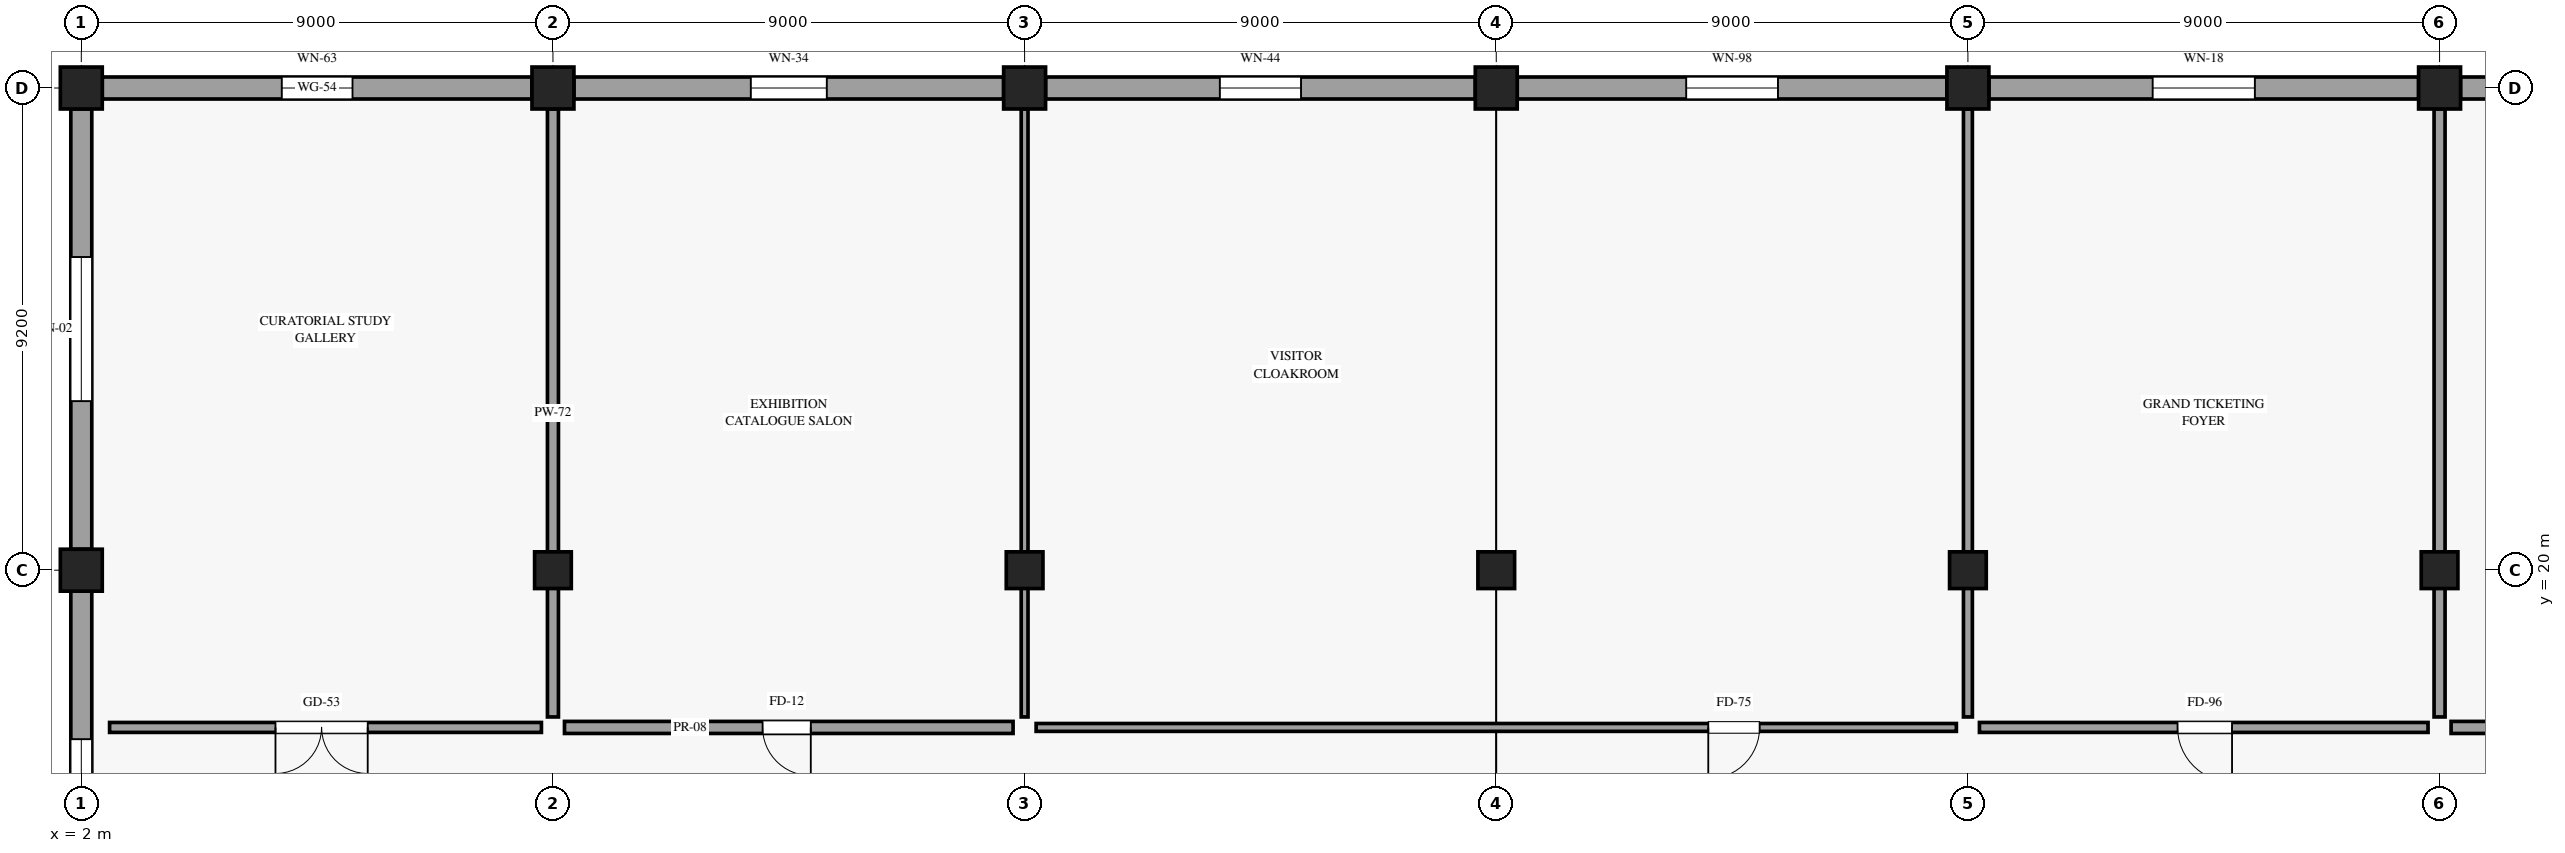
"""IFC4 building model, lengths in metres.
Left out: names, types, materials, properties, quantities, classifications, styles, units other than length and angle.
Written with IfcOpenShell. Run it as: python <this file> out.ifc"""

import sys

from ifc_helpers import new_model, si_unit, direction, frame, frame_2d, origin, origin_2d, place, context, subcontext, project, spatial, rectangle, extrude, element, fill, save


model = new_model("IFC4")
c1 = context("Model", 3, precision=1e-05, world=origin(), true_north=direction((0.0, 1.0)))
c2 = subcontext(c1, "Body", "Model", "MODEL_VIEW")
j1 = project(units=[si_unit("LENGTHUNIT", "METRE"), si_unit("PLANEANGLEUNIT", "RADIAN")], contexts=[c1])
p1 = place(None, origin())
s1 = spatial("IfcSite", under=j1, at=p1, CompositionType="ELEMENT")
p2 = place(p1, origin())
s2 = spatial("IfcBuilding", under=s1, at=p2, CompositionType="ELEMENT")
p3 = place(p2, origin())
s3 = spatial("IfcBuildingStorey", under=s2, at=p3, CompositionType="ELEMENT", Elevation=0.0)
for number, where, z_axis, x_axis in (
    (1, (2.0, 20.0, 0.0), (0.0, 0.0, 1.0), (1.0, 0.0, 0.0)),
    (2, (2.0, 29.2, 0.0), (0.0, 0.0, 1.0), (1.0, 0.0, 0.0)),
):
    element("IfcColumn", number, at=place(p3, frame(where, z_axis=z_axis, x_axis=x_axis)), inside=s3, PredefinedType="COLUMN", context=c2, shape_type="SweptSolid", body=[
        extrude(rectangle(XDim=0.8, YDim=0.8, at=origin_2d()), origin(), (0.0, 0.0, 1.0), 5.4),
    ])
p4 = place(p3, frame((11.0, 20.0, 0.0), z_axis=(0.0, 0.0, 1.0), x_axis=(1.0, 0.0, 0.0)))
e3 = element("IfcColumn", 3, at=p4, inside=s3, PredefinedType="COLUMN", context=c2, shape_type="SweptSolid", body=[
    extrude(rectangle(XDim=0.7, YDim=0.7, at=origin_2d()), origin(), (0.0, 0.0, 1.0), 5.4),
])
p5 = place(p3, frame((11.0, 29.2, 0.0), z_axis=(0.0, 0.0, 1.0), x_axis=(1.0, 0.0, 0.0)))
e4 = element("IfcColumn", 4, at=p5, inside=s3, PredefinedType="COLUMN", context=c2, shape_type="SweptSolid", body=[
    extrude(rectangle(XDim=0.8, YDim=0.8, at=origin_2d()), origin(), (0.0, 0.0, 1.0), 5.4),
])
p6 = place(p3, frame((20.0, 20.0, 0.0), z_axis=(0.0, 0.0, 1.0), x_axis=(1.0, 0.0, 0.0)))
e5 = element("IfcColumn", 5, at=p6, inside=s3, PredefinedType="COLUMN", context=c2, shape_type="SweptSolid", body=[
    extrude(rectangle(XDim=0.7, YDim=0.7, at=origin_2d()), origin(), (0.0, 0.0, 1.0), 5.4),
])
p7 = place(p3, frame((20.0, 29.2, 0.0), z_axis=(0.0, 0.0, 1.0), x_axis=(1.0, 0.0, 0.0)))
e6 = element("IfcColumn", 6, at=p7, inside=s3, PredefinedType="COLUMN", context=c2, shape_type="SweptSolid", body=[
    extrude(rectangle(XDim=0.8, YDim=0.8, at=origin_2d()), origin(), (0.0, 0.0, 1.0), 5.4),
])
p8 = place(p3, frame((29.0, 20.0, 0.0), z_axis=(0.0, 0.0, 1.0), x_axis=(1.0, 0.0, 0.0)))
e7 = element("IfcColumn", 7, at=p8, inside=s3, PredefinedType="COLUMN", context=c2, shape_type="SweptSolid", body=[
    extrude(rectangle(XDim=0.7, YDim=0.7, at=origin_2d()), origin(), (0.0, 0.0, 1.0), 5.4),
])
p9 = place(p3, frame((29.0, 29.2, 0.0), z_axis=(0.0, 0.0, 1.0), x_axis=(1.0, 0.0, 0.0)))
e8 = element("IfcColumn", 8, at=p9, inside=s3, PredefinedType="COLUMN", context=c2, shape_type="SweptSolid", body=[
    extrude(rectangle(XDim=0.8, YDim=0.8, at=origin_2d()), origin(), (0.0, 0.0, 1.0), 5.4),
])
p10 = place(p3, frame((38.0, 20.0, 0.0), z_axis=(0.0, 0.0, 1.0), x_axis=(1.0, 0.0, 0.0)))
e9 = element("IfcColumn", 9, at=p10, inside=s3, PredefinedType="COLUMN", context=c2, shape_type="SweptSolid", body=[
    extrude(rectangle(XDim=0.7, YDim=0.7, at=origin_2d()), origin(), (0.0, 0.0, 1.0), 5.4),
])
p11 = place(p3, frame((38.0, 29.2, 0.0), z_axis=(0.0, 0.0, 1.0), x_axis=(1.0, 0.0, 0.0)))
e10 = element("IfcColumn", 10, at=p11, inside=s3, PredefinedType="COLUMN", context=c2, shape_type="SweptSolid", body=[
    extrude(rectangle(XDim=0.8, YDim=0.8, at=origin_2d()), origin(), (0.0, 0.0, 1.0), 5.4),
])
p12 = place(p3, frame((47.0, 20.0, 0.0), z_axis=(0.0, 0.0, 1.0), x_axis=(1.0, 0.0, 0.0)))
e11 = element("IfcColumn", 11, at=p12, inside=s3, PredefinedType="COLUMN", context=c2, shape_type="SweptSolid", body=[
    extrude(rectangle(XDim=0.7, YDim=0.7, at=origin_2d()), origin(), (0.0, 0.0, 1.0), 5.4),
])
p13 = place(p3, frame((47.0, 29.2, 0.0), z_axis=(0.0, 0.0, 1.0), x_axis=(1.0, 0.0, 0.0)))
e12 = element("IfcColumn", 12, at=p13, inside=s3, PredefinedType="COLUMN", context=c2, shape_type="SweptSolid", body=[
    extrude(rectangle(XDim=0.8, YDim=0.8, at=origin_2d()), origin(), (0.0, 0.0, 1.0), 5.4),
])
p14 = place(p3, frame((2.4, 29.2, 0.0), z_axis=(0.0, 0.0, 1.0), x_axis=(1.0, 0.0, 0.0)))
e13 = element("IfcWall", 13, at=p14, inside=s3, PredefinedType="STANDARD", context=c2, shape_type="SweptSolid", body=[
    extrude(rectangle(XDim=8.2, YDim=0.42, at=frame_2d((4.1, 0.0))), origin(), (0.0, 0.0, 1.0), 4.095),
])
p15 = place(p14, frame((3.425, 0.0, 0.85)))
e14 = element("IfcOpeningElement", 14, at=p15, cuts=e13, PredefinedType="OPENING", context=c2, shape_type="SweptSolid", body=[
    extrude(rectangle(XDim=1.35, YDim=1.75, at=frame_2d((0.675, 0.875))), frame((0.0, 0.22, 0.0), z_axis=(0.0, -1.0, 0.0), x_axis=(1.0, 0.0, 0.0)), (0.0, 0.0, 1.0), 0.44),
])
p16 = place(p3, frame((11.4, 29.2, 0.0), z_axis=(0.0, 0.0, 1.0), x_axis=(1.0, 0.0, 0.0)))
e15 = element("IfcWall", 15, at=p16, inside=s3, PredefinedType="STANDARD", context=c2, shape_type="SweptSolid", body=[
    extrude(rectangle(XDim=8.2, YDim=0.42, at=frame_2d((4.1, 0.0))), origin(), (0.0, 0.0, 1.0), 4.095),
])
p17 = place(p16, frame((3.375, 0.0, 0.85)))
e16 = element("IfcOpeningElement", 16, at=p17, cuts=e15, PredefinedType="OPENING", context=c2, shape_type="SweptSolid", body=[
    extrude(rectangle(XDim=1.45, YDim=1.85, at=frame_2d((0.725, 0.925))), frame((0.0, 0.22, 0.0), z_axis=(0.0, -1.0, 0.0), x_axis=(1.0, 0.0, 0.0)), (0.0, 0.0, 1.0), 0.44),
])
p18 = place(p3, frame((20.4, 29.2, 0.0), z_axis=(0.0, 0.0, 1.0), x_axis=(1.0, 0.0, 0.0)))
e17 = element("IfcWall", 17, at=p18, inside=s3, PredefinedType="STANDARD", context=c2, shape_type="SweptSolid", body=[
    extrude(rectangle(XDim=8.2, YDim=0.42, at=frame_2d((4.1, 0.0))), origin(), (0.0, 0.0, 1.0), 4.095),
])
p19 = place(p18, frame((3.325, 0.0, 0.85)))
e18 = element("IfcOpeningElement", 18, at=p19, cuts=e17, PredefinedType="OPENING", context=c2, shape_type="SweptSolid", body=[
    extrude(rectangle(XDim=1.55, YDim=1.95, at=frame_2d((0.775, 0.975))), frame((0.0, 0.22, 0.0), z_axis=(0.0, -1.0, 0.0), x_axis=(1.0, 0.0, 0.0)), (0.0, 0.0, 1.0), 0.44),
])
p20 = place(p3, frame((29.4, 29.2, 0.0), z_axis=(0.0, 0.0, 1.0), x_axis=(1.0, 0.0, 0.0)))
e19 = element("IfcWall", 19, at=p20, inside=s3, PredefinedType="STANDARD", context=c2, shape_type="SweptSolid", body=[
    extrude(rectangle(XDim=8.2, YDim=0.42, at=frame_2d((4.1, 0.0))), origin(), (0.0, 0.0, 1.0), 4.095),
])
p21 = place(p20, frame((3.225, 0.0, 0.85)))
e20 = element("IfcOpeningElement", 20, at=p21, cuts=e19, PredefinedType="OPENING", context=c2, shape_type="SweptSolid", body=[
    extrude(rectangle(XDim=1.75, YDim=2.05, at=frame_2d((0.875, 1.025))), frame((0.0, 0.22, 0.0), z_axis=(0.0, -1.0, 0.0), x_axis=(1.0, 0.0, 0.0)), (0.0, 0.0, 1.0), 0.44),
])
p22 = place(p3, frame((38.4, 29.2, 0.0), z_axis=(0.0, 0.0, 1.0), x_axis=(1.0, 0.0, 0.0)))
e21 = element("IfcWall", 21, at=p22, inside=s3, PredefinedType="STANDARD", context=c2, shape_type="SweptSolid", body=[
    extrude(rectangle(XDim=8.2, YDim=0.42, at=frame_2d((4.1, 0.0))), origin(), (0.0, 0.0, 1.0), 4.095),
])
p23 = place(p22, frame((3.125, 0.0, 0.85)))
e22 = element("IfcOpeningElement", 22, at=p23, cuts=e21, PredefinedType="OPENING", context=c2, shape_type="SweptSolid", body=[
    extrude(rectangle(XDim=1.95, YDim=2.15, at=frame_2d((0.975, 1.075))), frame((0.0, 0.22, 0.0), z_axis=(0.0, -1.0, 0.0), x_axis=(1.0, 0.0, 0.0)), (0.0, 0.0, 1.0), 0.44),
])
p24 = place(p3, frame((47.4, 29.2, 0.0), z_axis=(0.0, 0.0, 1.0), x_axis=(1.0, 0.0, 0.0)))
e23 = element("IfcWall", 23, at=p24, inside=s3, PredefinedType="STANDARD", context=c2, shape_type="SweptSolid", body=[
    extrude(rectangle(XDim=8.2, YDim=0.42, at=frame_2d((4.1, 0.0))), origin(), (0.0, 0.0, 1.0), 4.095),
])
p25 = place(p24, frame((3.075, 0.0, 0.85)))
e24 = element("IfcOpeningElement", 24, at=p25, cuts=e23, PredefinedType="OPENING", context=c2, shape_type="SweptSolid", body=[
    extrude(rectangle(XDim=2.05, YDim=2.2, at=frame_2d((1.025, 1.1))), frame((0.0, 0.22, 0.0), z_axis=(0.0, -1.0, 0.0), x_axis=(1.0, 0.0, 0.0)), (0.0, 0.0, 1.0), 0.44),
])
p26 = place(p3, frame((2.0, 11.4, 0.0), z_axis=(0.0, 0.0, 1.0), x_axis=(0.0, 1.0, 0.0)))
e25 = element("IfcWall", 25, at=p26, inside=s3, PredefinedType="STANDARD", context=c2, shape_type="SweptSolid", body=[
    extrude(rectangle(XDim=8.2, YDim=0.4, at=frame_2d((4.1, 0.0))), origin(), (0.0, 0.0, 1.0), 4.095),
])
p27 = place(p26, frame((2.825, 0.0, 0.85)))
e26 = element("IfcOpeningElement", 26, at=p27, cuts=e25, PredefinedType="OPENING", context=c2, shape_type="SweptSolid", body=[
    extrude(rectangle(XDim=2.55, YDim=2.4, at=frame_2d((1.275, 1.2))), frame((0.0, 0.21, 0.0), z_axis=(0.0, -1.0, 0.0), x_axis=(1.0, 0.0, 0.0)), (0.0, 0.0, 1.0), 0.42),
])
p28 = place(p3, frame((2.0, 20.4, 0.0), z_axis=(0.0, 0.0, 1.0), x_axis=(0.0, 1.0, 0.0)))
e27 = element("IfcWall", 27, at=p28, inside=s3, PredefinedType="STANDARD", context=c2, shape_type="SweptSolid", body=[
    extrude(rectangle(XDim=8.4, YDim=0.4, at=frame_2d((4.2, 0.0))), origin(), (0.0, 0.0, 1.0), 4.095),
])
p29 = place(p28, frame((2.825, 0.0, 0.85)))
e28 = element("IfcOpeningElement", 28, at=p29, cuts=e27, PredefinedType="OPENING", context=c2, shape_type="SweptSolid", body=[
    extrude(rectangle(XDim=2.75, YDim=2.45, at=frame_2d((1.375, 1.225))), frame((0.0, 0.21, 0.0), z_axis=(0.0, -1.0, 0.0), x_axis=(1.0, 0.0, 0.0)), (0.0, 0.0, 1.0), 0.42),
])
p30 = place(p3, frame((2.54, 17.0, 0.0), z_axis=(0.0, 0.0, 1.0), x_axis=(1.0, 0.0, 0.0)))
e29 = element("IfcWall", 29, at=p30, inside=s3, PredefinedType="PARTITIONING", context=c2, shape_type="SweptSolid", body=[
    extrude(rectangle(XDim=8.24, YDim=0.19, at=frame_2d((4.12, 0.0))), origin(), (0.0, 0.0, 1.0), 4.095),
])
p31 = place(p30, frame((4.925, 0.0, 0.0), z_axis=(0.0, 0.0, 1.0), x_axis=(-1.0, 0.0, 0.0)))
e30 = element("IfcOpeningElement", 30, at=p31, cuts=e29, PredefinedType="OPENING", context=c2, shape_type="SweptSolid", body=[
    extrude(rectangle(XDim=1.76, YDim=2.45, at=frame_2d((0.88, 1.225))), frame((0.0, 0.105, 0.0), z_axis=(0.0, -1.0, 0.0), x_axis=(1.0, 0.0, 0.0)), (0.0, 0.0, 1.0), 0.21),
])
p32 = place(p3, frame((11.0, 17.2, 0.0), z_axis=(0.0, 0.0, 1.0), x_axis=(0.0, 1.0, 0.0)))
e31 = element("IfcWall", 31, at=p32, inside=s3, PredefinedType="PARTITIONING", context=c2, shape_type="SweptSolid", body=[
    extrude(rectangle(XDim=11.6, YDim=0.21, at=frame_2d((5.8, 0.0))), origin(), (0.0, 0.0, 1.0), 4.095),
])
p33 = place(p3, frame((11.22, 17.0, 0.0), z_axis=(0.0, 0.0, 1.0), x_axis=(1.0, 0.0, 0.0)))
e32 = element("IfcWall", 32, at=p33, inside=s3, PredefinedType="PARTITIONING", context=c2, shape_type="SweptSolid", body=[
    extrude(rectangle(XDim=8.56, YDim=0.23, at=frame_2d((4.28, 0.0))), origin(), (0.0, 0.0, 1.0), 4.095),
])
p34 = place(p33, frame((4.7, 0.0, 0.0), z_axis=(0.0, 0.0, 1.0), x_axis=(-1.0, 0.0, 0.0)))
e33 = element("IfcOpeningElement", 33, at=p34, cuts=e32, PredefinedType="OPENING", context=c2, shape_type="SweptSolid", body=[
    extrude(rectangle(XDim=0.92, YDim=2.12, at=frame_2d((0.46, 1.06))), frame((0.0, 0.125, 0.0), z_axis=(0.0, -1.0, 0.0), x_axis=(1.0, 0.0, 0.0)), (0.0, 0.0, 1.0), 0.25),
])
p35 = place(p3, frame((20.0, 17.2, 0.0), z_axis=(0.0, 0.0, 1.0), x_axis=(0.0, 1.0, 0.0)))
e34 = element("IfcWall", 34, at=p35, inside=s3, PredefinedType="PARTITIONING", context=c2, shape_type="SweptSolid", body=[
    extrude(rectangle(XDim=11.6, YDim=0.13, at=frame_2d((5.8, 0.0))), origin(), (0.0, 0.0, 1.0), 4.095),
])
p36 = place(p3, frame((20.22, 17.0, 0.0), z_axis=(0.0, 0.0, 1.0), x_axis=(1.0, 0.0, 0.0)))
e35 = element("IfcWall", 35, at=p36, inside=s3, PredefinedType="PARTITIONING", context=c2, shape_type="SweptSolid", body=[
    extrude(rectangle(XDim=17.56, YDim=0.15, at=frame_2d((8.78, 0.0))), origin(), (0.0, 0.0, 1.0), 4.095),
])
p37 = place(p36, frame((13.806, 0.0, 0.0), z_axis=(0.0, 0.0, 1.0), x_axis=(-1.0, 0.0, 0.0)))
e36 = element("IfcOpeningElement", 36, at=p37, cuts=e35, PredefinedType="OPENING", context=c2, shape_type="SweptSolid", body=[
    extrude(rectangle(XDim=0.98, YDim=2.18, at=frame_2d((0.49, 1.09))), frame((0.0, 0.085, 0.0), z_axis=(0.0, -1.0, 0.0), x_axis=(1.0, 0.0, 0.0)), (0.0, 0.0, 1.0), 0.17),
])
p38 = place(p3, frame((38.0, 17.2, 0.0), z_axis=(0.0, 0.0, 1.0), x_axis=(0.0, 1.0, 0.0)))
e37 = element("IfcWall", 37, at=p38, inside=s3, PredefinedType="PARTITIONING", context=c2, shape_type="SweptSolid", body=[
    extrude(rectangle(XDim=11.6, YDim=0.17, at=frame_2d((5.8, 0.0))), origin(), (0.0, 0.0, 1.0), 4.095),
])
p39 = place(p3, frame((38.22, 17.0, 0.0), z_axis=(0.0, 0.0, 1.0), x_axis=(1.0, 0.0, 0.0)))
e38 = element("IfcWall", 38, at=p39, inside=s3, PredefinedType="PARTITIONING", context=c2, shape_type="SweptSolid", body=[
    extrude(rectangle(XDim=8.56, YDim=0.19, at=frame_2d((4.28, 0.0))), origin(), (0.0, 0.0, 1.0), 4.095),
])
p40 = place(p39, frame((4.82, 0.0, 0.0), z_axis=(0.0, 0.0, 1.0), x_axis=(-1.0, 0.0, 0.0)))
e39 = element("IfcOpeningElement", 39, at=p40, cuts=e38, PredefinedType="OPENING", context=c2, shape_type="SweptSolid", body=[
    extrude(rectangle(XDim=1.04, YDim=2.22, at=frame_2d((0.52, 1.11))), frame((0.0, 0.105, 0.0), z_axis=(0.0, -1.0, 0.0), x_axis=(1.0, 0.0, 0.0)), (0.0, 0.0, 1.0), 0.21),
])
p41 = place(p3, frame((47.0, 17.2, 0.0), z_axis=(0.0, 0.0, 1.0), x_axis=(0.0, 1.0, 0.0)))
e40 = element("IfcWall", 40, at=p41, inside=s3, PredefinedType="PARTITIONING", context=c2, shape_type="SweptSolid", body=[
    extrude(rectangle(XDim=11.6, YDim=0.21, at=frame_2d((5.8, 0.0))), origin(), (0.0, 0.0, 1.0), 4.095),
])
p42 = place(p3, frame((47.22, 17.0, 0.0), z_axis=(0.0, 0.0, 1.0), x_axis=(1.0, 0.0, 0.0)))
e41 = element("IfcWall", 41, at=p42, inside=s3, PredefinedType="PARTITIONING", context=c2, shape_type="SweptSolid", body=[
    extrude(rectangle(XDim=9.73, YDim=0.23, at=frame_2d((4.865, 0.0))), origin(), (0.0, 0.0, 1.0), 4.095),
])
p43 = place(p42, frame((5.173, 0.0, 0.0), z_axis=(0.0, 0.0, 1.0), x_axis=(-1.0, 0.0, 0.0)))
e42 = element("IfcOpeningElement", 42, at=p43, cuts=e41, PredefinedType="OPENING", context=c2, shape_type="SweptSolid", body=[
    extrude(rectangle(XDim=1.66, YDim=2.42, at=frame_2d((0.83, 1.21))), frame((0.0, 0.125, 0.0), z_axis=(0.0, -1.0, 0.0), x_axis=(1.0, 0.0, 0.0)), (0.0, 0.0, 1.0), 0.25),
])
p44 = place(p15, origin())
e43 = element("IfcWindow", 43, at=p44, inside=s3, PartitioningType="SINGLE_PANEL", PredefinedType="WINDOW", context=c2, shape_type="SweptSolid", body=[
    extrude(rectangle(XDim=1.35, YDim=1.75, at=frame_2d((0.675, 0.875))), frame((0.0, 0.03, 0.0), z_axis=(0.0, -1.0, 0.0), x_axis=(1.0, 0.0, 0.0)), (0.0, 0.0, 1.0), 0.06),
])
fill(e14, e43)
p45 = place(p17, origin())
e44 = element("IfcWindow", 44, at=p45, inside=s3, PartitioningType="SINGLE_PANEL", PredefinedType="WINDOW", context=c2, shape_type="SweptSolid", body=[
    extrude(rectangle(XDim=1.45, YDim=1.85, at=frame_2d((0.725, 0.925))), frame((0.0, 0.03, 0.0), z_axis=(0.0, -1.0, 0.0), x_axis=(1.0, 0.0, 0.0)), (0.0, 0.0, 1.0), 0.06),
])
fill(e16, e44)
p46 = place(p19, origin())
e45 = element("IfcWindow", 45, at=p46, inside=s3, PartitioningType="SINGLE_PANEL", PredefinedType="WINDOW", context=c2, shape_type="SweptSolid", body=[
    extrude(rectangle(XDim=1.55, YDim=1.95, at=frame_2d((0.775, 0.975))), frame((0.0, 0.03, 0.0), z_axis=(0.0, -1.0, 0.0), x_axis=(1.0, 0.0, 0.0)), (0.0, 0.0, 1.0), 0.06),
])
fill(e18, e45)
p47 = place(p21, origin())
e46 = element("IfcWindow", 46, at=p47, inside=s3, PartitioningType="SINGLE_PANEL", PredefinedType="WINDOW", context=c2, shape_type="SweptSolid", body=[
    extrude(rectangle(XDim=1.75, YDim=2.05, at=frame_2d((0.875, 1.025))), frame((0.0, 0.03, 0.0), z_axis=(0.0, -1.0, 0.0), x_axis=(1.0, 0.0, 0.0)), (0.0, 0.0, 1.0), 0.06),
])
fill(e20, e46)
p48 = place(p23, origin())
e47 = element("IfcWindow", 47, at=p48, inside=s3, PartitioningType="SINGLE_PANEL", PredefinedType="WINDOW", context=c2, shape_type="SweptSolid", body=[
    extrude(rectangle(XDim=1.95, YDim=2.15, at=frame_2d((0.975, 1.075))), frame((0.0, 0.03, 0.0), z_axis=(0.0, -1.0, 0.0), x_axis=(1.0, 0.0, 0.0)), (0.0, 0.0, 1.0), 0.06),
])
fill(e22, e47)
p49 = place(p27, origin())
e48 = element("IfcWindow", 48, at=p49, inside=s3, PartitioningType="SINGLE_PANEL", PredefinedType="WINDOW", context=c2, shape_type="SweptSolid", body=[
    extrude(rectangle(XDim=2.55, YDim=2.4, at=frame_2d((1.275, 1.2))), frame((0.0, 0.03, 0.0), z_axis=(0.0, -1.0, 0.0), x_axis=(1.0, 0.0, 0.0)), (0.0, 0.0, 1.0), 0.06),
])
fill(e26, e48)
p50 = place(p29, origin())
e49 = element("IfcWindow", 49, at=p50, inside=s3, PartitioningType="SINGLE_PANEL", PredefinedType="WINDOW", context=c2, shape_type="SweptSolid", body=[
    extrude(rectangle(XDim=2.75, YDim=2.45, at=frame_2d((1.375, 1.225))), frame((0.0, 0.03, 0.0), z_axis=(0.0, -1.0, 0.0), x_axis=(1.0, 0.0, 0.0)), (0.0, 0.0, 1.0), 0.06),
])
fill(e28, e49)
p51 = place(p31, origin())
e50 = element("IfcDoor", 50, at=p51, inside=s3, OperationType="DOUBLE_DOOR_SINGLE_SWING", PredefinedType="DOOR", context=c2, shape_type="SweptSolid", body=[
    extrude(rectangle(XDim=1.76, YDim=2.45, at=frame_2d((0.88, 1.225))), frame((0.0, 0.025, 0.0), z_axis=(0.0, -1.0, 0.0), x_axis=(1.0, 0.0, 0.0)), (0.0, 0.0, 1.0), 0.05),
])
fill(e30, e50)
p52 = place(p34, origin())
e51 = element("IfcDoor", 51, at=p52, inside=s3, OperationType="SINGLE_SWING_LEFT", PredefinedType="DOOR", context=c2, shape_type="SweptSolid", body=[
    extrude(rectangle(XDim=0.92, YDim=2.12, at=frame_2d((0.46, 1.06))), frame((0.0, 0.025, 0.0), z_axis=(0.0, -1.0, 0.0), x_axis=(1.0, 0.0, 0.0)), (0.0, 0.0, 1.0), 0.05),
])
fill(e33, e51)
p53 = place(p37, origin())
e52 = element("IfcDoor", 52, at=p53, inside=s3, OperationType="SINGLE_SWING_RIGHT", PredefinedType="DOOR", context=c2, shape_type="SweptSolid", body=[
    extrude(rectangle(XDim=0.98, YDim=2.18, at=frame_2d((0.49, 1.09))), frame((0.0, 0.025, 0.0), z_axis=(0.0, -1.0, 0.0), x_axis=(1.0, 0.0, 0.0)), (0.0, 0.0, 1.0), 0.05),
])
fill(e36, e52)
p54 = place(p40, origin())
e53 = element("IfcDoor", 53, at=p54, inside=s3, OperationType="SINGLE_SWING_LEFT", PredefinedType="DOOR", context=c2, shape_type="SweptSolid", body=[
    extrude(rectangle(XDim=1.04, YDim=2.22, at=frame_2d((0.52, 1.11))), frame((0.0, 0.025, 0.0), z_axis=(0.0, -1.0, 0.0), x_axis=(1.0, 0.0, 0.0)), (0.0, 0.0, 1.0), 0.05),
])
fill(e39, e53)
save(model, sys.argv[1])
